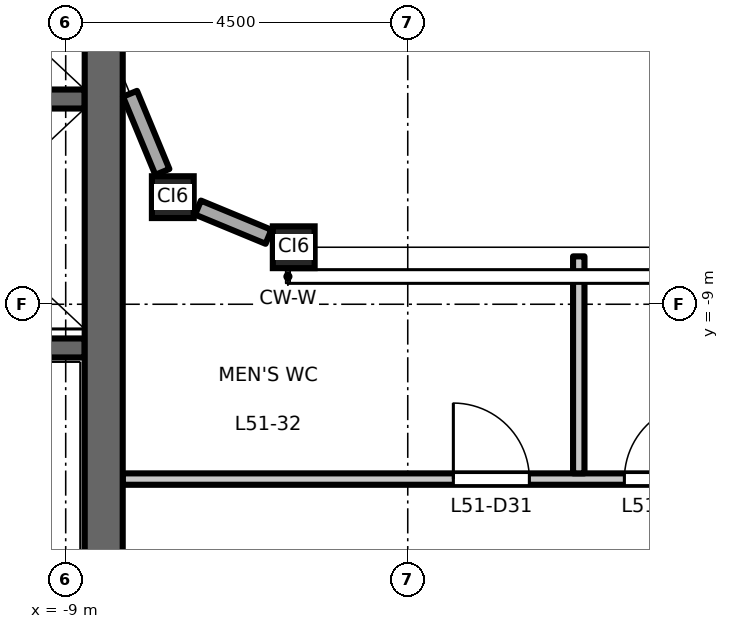
"""IFC4 building model, lengths in metres.
Left out: names, types, materials, properties, quantities, classifications, styles, units other than length and angle.
Written with IfcOpenShell. Run it as: python <this file> out.ifc"""

import sys

from ifc_helpers import new_model, si_unit, direction, frame, frame_2d, origin, origin_2d, place, context, subcontext, project, spatial, rectangle, hollow_rectangle, extrude, element, fill, save


model = new_model("IFC4")
c1 = context("Model", 3, precision=1e-05, world=origin(), true_north=direction((0.0, 1.0)))
c2 = subcontext(c1, "Body", "Model", "MODEL_VIEW")
j1 = project(units=[si_unit("LENGTHUNIT", "METRE"), si_unit("PLANEANGLEUNIT", "RADIAN")], contexts=[c1])
p1 = place(None, origin())
s1 = spatial("IfcSite", under=j1, at=p1, CompositionType="ELEMENT")
p2 = place(p1, origin())
s2 = spatial("IfcBuilding", under=s1, at=p2, CompositionType="ELEMENT")
p3 = place(p2, frame((0.0, 0.0, 237.7)))
s3 = spatial("IfcBuildingStorey", under=s2, at=p3, CompositionType="ELEMENT", Elevation=237.7)
for number, where, z_axis, x_axis in (
    (1, (-7.591, -7.591, 0.0), (0.0, 0.0, 1.0), (1.0, 0.0, 0.0)),
    (2, (-6.0, -8.25, 0.0), (0.0, 0.0, 1.0), (1.0, 0.0, 0.0)),
):
    element("IfcColumn", number, at=place(p3, frame(where, z_axis=z_axis, x_axis=x_axis)), inside=s3, PredefinedType="COLUMN", context=c2, shape_type="SweptSolid", body=[
        extrude(hollow_rectangle(XDim=0.55, YDim=0.55, WallThickness=0.028, at=origin_2d()), origin(), (0.0, 0.0, 1.0), 4.5),
    ])
p4 = place(p3, frame((-8.75, -6.3, 0.0), z_axis=(0.0, 0.0, 1.0), x_axis=(-1.0, 0.0, 0.0)))
e3 = element("IfcWall", 3, at=p4, inside=s3, PredefinedType="SHEAR", context=c2, shape_type="SweptSolid", body=[
    extrude(rectangle(XDim=3.1, YDim=0.25, at=frame_2d((1.55, 0.0))), origin(), (0.0, 0.0, 1.0), 4.35),
])
p5 = place(p3, frame((-8.75, -9.575, 0.0), z_axis=(0.0, 0.0, 1.0), x_axis=(-1.0, 0.0, 0.0)))
e4 = element("IfcWall", 4, at=p5, inside=s3, PredefinedType="SHEAR", context=c2, shape_type="SweptSolid", body=[
    extrude(rectangle(XDim=8.0, YDim=0.25, at=frame_2d((4.0, 0.0))), origin(), (0.0, 0.0, 1.0), 4.35),
])
p6 = place(p5, frame((6.65, 0.0, 0.0)))
e5 = element("IfcOpeningElement", 5, at=p6, cuts=e4, PredefinedType="OPENING", context=c2, shape_type="SweptSolid", body=[
    extrude(rectangle(XDim=1.1, YDim=2.1, at=frame_2d((0.55, 1.05))), frame((0.0, 0.135, 0.0), z_axis=(0.0, -1.0, 0.0), x_axis=(1.0, 0.0, 0.0)), (0.0, 0.0, 1.0), 0.27),
])
p7 = place(p3, frame((-8.5, -13.0, 0.0), z_axis=(0.0, 0.0, 1.0), x_axis=(0.0, 1.0, 0.0)))
e6 = element("IfcWall", 6, at=p7, inside=s3, PredefinedType="SHEAR", context=c2, shape_type="SweptSolid", body=[
    extrude(rectangle(XDim=26.0, YDim=0.5, at=frame_2d((13.0, 0.0))), origin(), (0.0, 0.0, 1.0), 4.35),
])
p8 = place(p3, frame((-8.154, -6.231, 0.0), z_axis=(0.0, 0.0, 1.0), x_axis=(0.382635994082, -0.923899180665, 0.0)))
e7 = element("IfcWall", 7, at=p8, inside=s3, PredefinedType="STANDARD", context=c2, shape_type="SweptSolid", body=[
    extrude(rectangle(XDim=1.113, YDim=0.2, at=frame_2d((0.556, 0.0))), origin(), (0.0, 0.0, 1.0), 3.918),
])
p9 = place(p3, frame((-7.259, -7.729, 0.0), z_axis=(0.0, 0.0, 1.0), x_axis=(0.923859650767, -0.382731427616, 0.0)))
e8 = element("IfcWall", 8, at=p9, inside=s3, PredefinedType="STANDARD", context=c2, shape_type="SweptSolid", body=[
    extrude(rectangle(XDim=1.003, YDim=0.2, at=frame_2d((0.502, 0.0))), origin(), (0.0, 0.0, 1.0), 3.918),
])
p10 = place(p3, frame((-8.25, -11.3, 0.0), z_axis=(0.0, 0.0, 1.0), x_axis=(1.0, 0.0, 0.0)))
e9 = element("IfcWall", 9, at=p10, inside=s3, PredefinedType="PARTITIONING", context=c2, shape_type="SweptSolid", body=[
    extrude(rectangle(XDim=15.03, YDim=0.15, at=frame_2d((7.515, 0.0))), origin(), (0.0, 0.0, 1.0), 4.35),
])
p11 = place(p10, frame((4.35, 0.0, 0.0)))
e10 = element("IfcOpeningElement", 10, at=p11, cuts=e9, PredefinedType="OPENING", context=c2, shape_type="SweptSolid", body=[
    extrude(rectangle(XDim=1.0, YDim=2.1, at=frame_2d((0.5, 1.05))), frame((0.0, 0.085, 0.0), z_axis=(0.0, -1.0, 0.0), x_axis=(1.0, 0.0, 0.0)), (0.0, 0.0, 1.0), 0.17),
])
p12 = place(p10, frame((6.6, 0.0, 0.0)))
e11 = element("IfcOpeningElement", 11, at=p12, cuts=e9, PredefinedType="OPENING", context=c2, shape_type="SweptSolid", body=[
    extrude(rectangle(XDim=1.0, YDim=2.1, at=frame_2d((0.5, 1.05))), frame((0.0, 0.085, 0.0), z_axis=(0.0, -1.0, 0.0), x_axis=(1.0, 0.0, 0.0)), (0.0, 0.0, 1.0), 0.17),
])
p13 = place(p10, frame((13.38, 0.0, 0.0)))
e12 = element("IfcOpeningElement", 12, at=p13, cuts=e9, PredefinedType="OPENING", context=c2, shape_type="SweptSolid", body=[
    extrude(rectangle(XDim=1.0, YDim=2.1, at=frame_2d((0.5, 1.05))), frame((0.0, 0.085, 0.0), z_axis=(0.0, -1.0, 0.0), x_axis=(1.0, 0.0, 0.0)), (0.0, 0.0, 1.0), 0.17),
])
p14 = place(p3, frame((-2.25, -11.225, 0.0), z_axis=(0.0, 0.0, 1.0), x_axis=(0.0, 1.0, 0.0)))
e13 = element("IfcWall", 13, at=p14, inside=s3, PredefinedType="PARTITIONING", context=c2, shape_type="SweptSolid", body=[
    extrude(rectangle(XDim=2.855, YDim=0.15, at=frame_2d((1.427, 0.0))), origin(), (0.0, 0.0, 1.0), 4.35),
])
p15 = place(p11, origin())
e14 = element("IfcDoor", 14, at=p15, inside=s3, OperationType="SINGLE_SWING_LEFT", PredefinedType="DOOR", context=c2, shape_type="SweptSolid", body=[
    extrude(rectangle(XDim=1.0, YDim=2.1, at=frame_2d((0.5, 1.05))), frame((0.0, 0.025, 0.0), z_axis=(0.0, -1.0, 0.0), x_axis=(1.0, 0.0, 0.0)), (0.0, 0.0, 1.0), 0.05),
])
fill(e10, e14)
p16 = place(p12, origin())
e15 = element("IfcDoor", 15, at=p16, inside=s3, OperationType="SINGLE_SWING_RIGHT", PredefinedType="DOOR", context=c2, shape_type="SweptSolid", body=[
    extrude(rectangle(XDim=1.0, YDim=2.1, at=frame_2d((0.5, 1.05))), frame((0.0, 0.025, 0.0), z_axis=(0.0, -1.0, 0.0), x_axis=(1.0, 0.0, 0.0)), (0.0, 0.0, 1.0), 0.05),
])
fill(e11, e15)
save(model, sys.argv[1])
